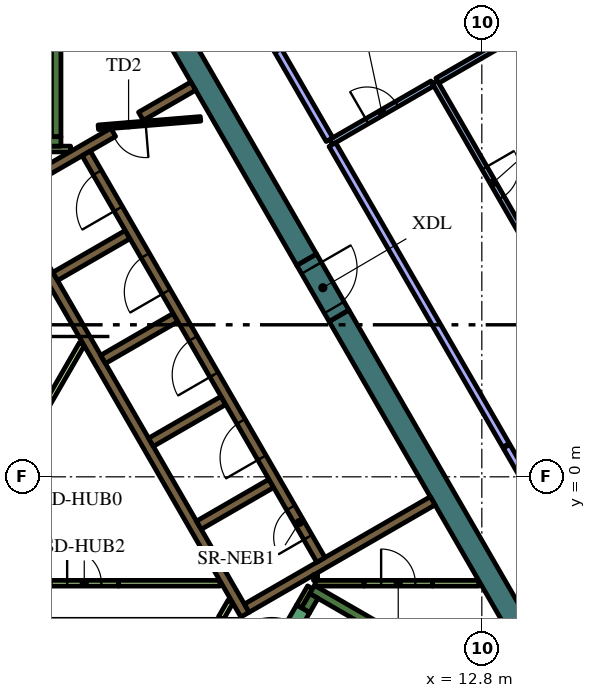
"""IFC4 building model, lengths in metres.
Left out: names, types, materials, properties, quantities, classifications, styles, units other than length and angle.
Written with IfcOpenShell. Run it as: python <this file> out.ifc"""

import sys

from ifc_helpers import new_model, si_unit, direction, frame, frame_2d, origin, place, context, subcontext, project, spatial, polyline, rectangle, outline, extrude, element, fill, save


model = new_model("IFC4")
c1 = context("Model", 3, precision=1e-05, world=origin(), true_north=direction((0.0, 1.0)))
c2 = subcontext(c1, "Body", "Model", "MODEL_VIEW")
j1 = project(units=[si_unit("LENGTHUNIT", "METRE"), si_unit("PLANEANGLEUNIT", "RADIAN")], contexts=[c1])
p1 = place(None, origin())
s1 = spatial("IfcSite", under=j1, at=p1, CompositionType="ELEMENT")
p2 = place(p1, origin())
s2 = spatial("IfcBuilding", under=s1, at=p2, CompositionType="ELEMENT")
p3 = place(p2, frame((0.0, 0.0, 283.8)))
s3 = spatial("IfcBuildingStorey", under=s2, at=p3, CompositionType="ELEMENT", Elevation=283.8)
for number, where, z_axis, x_axis in (
    (1, (9.042, 4.239, 0.0), (0.0, 0.0, 1.0), (0.5, -0.866, 0.0)),
    (2, (1.989, 16.456, 0.0), (0.0, 0.0, 1.0), (0.5, -0.866, 0.0)),
):
    element("IfcWall", number, at=place(p3, frame(where, z_axis=z_axis, x_axis=x_axis)), inside=s3, PredefinedType="SOLIDWALL", context=c2, shape_type="SweptSolid", body=[
        extrude(rectangle(XDim=12.406, YDim=0.6, at=frame_2d((6.203, 0.0))), origin(), (0.0, 0.0, 1.0), 4.2),
    ])
p4 = place(p3, frame((8.334, -2.964, 0.0), z_axis=(0.0, 0.0, 1.0), x_axis=(0.866016039709, -0.500016218704, 0.0)))
e3 = element("IfcWall", 3, at=p4, inside=s3, PredefinedType="SOLIDWALL", context=c2, shape_type="SweptSolid", body=[
    extrude(rectangle(XDim=7.05, YDim=0.25, at=frame_2d((3.525, 0.0))), origin(), (0.0, 0.0, 1.0), 4.2),
])
p5 = place(p3, frame((8.163, -3.511, 0.0), z_axis=(0.0, 0.0, 1.0), x_axis=(0.500127794843, 0.865951608824, 0.0)))
e4 = element("IfcWall", 4, at=p5, inside=s3, PredefinedType="SOLIDWALL", context=c2, shape_type="SweptSolid", body=[
    extrude(rectangle(XDim=0.435, YDim=0.25, at=frame_2d((0.217, 0.0))), origin(), (0.0, 0.0, 1.0), 4.2),
])
p6 = place(p3, frame((1.6, 8.95, 0.0), z_axis=(0.0, 0.0, 1.0), x_axis=(0.0, 1.0, 0.0)))
e5 = element("IfcWall", 5, at=p6, inside=s3, PredefinedType="SOLIDWALL", context=c2, shape_type="SweptSolid", body=[
    extrude(rectangle(XDim=6.8, YDim=0.25, at=frame_2d((3.4, 0.0))), origin(), (0.0, 0.0, 1.0), 4.2),
])
p7 = place(p3, frame((1.05, 8.825, 0.0), z_axis=(0.0, 0.0, 1.0), x_axis=(1.0, 0.0, 0.0)))
e6 = element("IfcWall", 6, at=p7, inside=s3, PredefinedType="SOLIDWALL", context=c2, shape_type="SweptSolid", body=[
    extrude(rectangle(XDim=0.675, YDim=0.25, at=frame_2d((0.337, 0.0))), origin(), (0.0, 0.0, 1.0), 4.2),
])
p8 = place(p3, origin())
e7 = element("IfcWall", 7, at=p8, inside=s3, PredefinedType="SOLIDWALL", context=c2, shape_type="SweptSolid", body=[
    extrude(outline(polyline([(0.332, 6.925), (0.335, 6.925), (0.335, 6.925), (0.335, 6.925), (0.335, 7.075), (0.335, 7.075), (0.335, 7.075), (0.245, 7.075), (0.035, 7.439), (0.252, 7.564), (0.377, 7.348), (1.512, 5.382), (1.637, 5.165), (2.221, 4.153), (2.771, 3.199), (2.896, 2.983), (3.138, 2.564), (4.031, 1.017), (4.156, 0.801), (5.292, -1.165), (5.417, -1.382), (6.073, -2.519), (6.552, -3.348), (6.677, -3.564), (6.46, -3.689), (0.332, 6.925)])), origin(), (0.0, 0.0, 1.0), 4.2),
])
p9 = place(p3, frame((3.1, 9.064, 0.0), z_axis=(0.0, 0.0, 1.0), x_axis=(-0.866030133475, -0.499991807846, 0.0)))
e8 = element("IfcWall", 8, at=p9, inside=s3, PredefinedType="SOLIDWALL", context=c2, shape_type="SweptSolid", body=[
    extrude(rectangle(XDim=3.217, YDim=0.25, at=frame_2d((1.608, 0.0))), origin(), (0.0, 0.0, 1.0), 4.2),
])
p10 = place(p3, frame((1.574, 5.274, 0.0), z_axis=(0.0, 0.0, 1.0), x_axis=(0.866028486751, 0.499994660107, 0.0)))
e9 = element("IfcWall", 9, at=p10, inside=s3, PredefinedType="SOLIDWALL", context=c2, shape_type="SweptSolid", body=[
    extrude(rectangle(XDim=2.2, YDim=0.25, at=frame_2d((1.1, 0.0))), origin(), (0.0, 0.0, 1.0), 4.2),
])
for number, where, z_axis, x_axis in (
    (10, (2.834, 3.091, 0.0), (0.0, 0.0, 1.0), (0.866, 0.5, 0.0)),
    (11, (4.094, 0.909, 0.0), (0.0, 0.0, 1.0), (0.866, 0.5, 0.0)),
    (12, (5.354, -1.274, 0.0), (0.0, 0.0, 1.0), (0.866, 0.5, 0.0)),
):
    element("IfcWall", number, at=place(p3, frame(where, z_axis=z_axis, x_axis=x_axis)), inside=s3, PredefinedType="SOLIDWALL", context=c2, shape_type="SweptSolid", body=[
        extrude(rectangle(XDim=2.2, YDim=0.25, at=frame_2d((1.1, 0.0))), origin(), (0.0, 0.0, 1.0), 4.2),
    ])
p11 = place(p3, frame((11.507, -0.631, 0.0), z_axis=(0.0, 0.0, 1.0), x_axis=(-0.866011447264, -0.500024172624, 0.0)))
e13 = element("IfcWall", 13, at=p11, inside=s3, PredefinedType="SOLIDWALL", context=c2, shape_type="SweptSolid", body=[
    extrude(rectangle(XDim=5.65, YDim=0.25, at=frame_2d((2.825, 0.0))), origin(), (0.0, 0.0, 1.0), 4.2),
])
p12 = place(p3, frame((3.83, 9.486, 0.0), z_axis=(0.0, 0.0, 1.0), x_axis=(0.865986202621, 0.500067892261, 0.0)))
e14 = element("IfcWall", 14, at=p12, inside=s3, PredefinedType="SOLIDWALL", context=c2, shape_type="SweptSolid", body=[
    extrude(rectangle(XDim=1.591, YDim=0.25, at=frame_2d((0.795, 0.0))), origin(), (0.0, 0.0, 1.0), 4.2),
])
for number, where, z_axis, x_axis in (
    (15, (0.941, 1.179, 0.0), (0.0, 0.0, 1.0), (0.5, 0.866, 0.0)),
    (16, (3.238, -2.8, 0.0), (0.0, 0.0, 1.0), (1.0, 0.0, 0.0)),
):
    element("IfcWall", number, at=place(p3, frame(where, z_axis=z_axis, x_axis=x_axis)), inside=s3, PredefinedType="PARTITIONING", context=c2, shape_type="SweptSolid", body=[
        extrude(rectangle(XDim=2.672, YDim=0.15, at=frame_2d((1.336, 0.0))), origin(), (0.0, 0.0, 1.0), 3.55),
    ])
p13 = place(p3, frame((1.05, 8.625, 0.0), z_axis=(0.0, 0.0, 1.0), x_axis=(1.0, 0.0, 0.0)))
e17 = element("IfcWall", 17, at=p13, inside=s3, PredefinedType="PARTITIONING", context=c2, shape_type="SweptSolid", body=[
    extrude(rectangle(XDim=0.929, YDim=0.15, at=frame_2d((0.464, 0.0))), origin(), (0.0, 0.0, 1.0), 3.55),
])
p14 = place(p3, frame((8.412, -2.8, 0.0), z_axis=(0.0, 0.0, 1.0), x_axis=(1.0, 0.0, 0.0)))
e18 = element("IfcWall", 18, at=p14, inside=s3, PredefinedType="PARTITIONING", context=c2, shape_type="SweptSolid", body=[
    extrude(rectangle(XDim=1.288, YDim=0.15, at=frame_2d((0.644, 0.0))), origin(), (0.0, 0.0, 1.0), 4.2),
])
p15 = place(p3, frame((8.37, -2.65, 0.0), z_axis=(0.0, 0.0, 1.0), x_axis=(1.0, 0.0, 0.0)))
e19 = element("IfcWall", 19, at=p15, inside=s3, PredefinedType="PARTITIONING", context=c2, shape_type="SweptSolid", body=[
    extrude(rectangle(XDim=0.108, YDim=0.15, at=frame_2d((0.054, 0.0))), origin(), (0.0, 0.0, 1.0), 4.2),
])
p16 = place(p3, frame((8.281, -2.907, 0.0), z_axis=(0.0, 0.0, 1.0), x_axis=(-0.500193841991, -0.86591346013, 0.0)))
e20 = element("IfcWall", 20, at=p16, inside=s3, PredefinedType="PARTITIONING", context=c2, shape_type="SweptSolid", body=[
    extrude(rectangle(XDim=0.583, YDim=0.15, at=frame_2d((0.292, 0.0))), origin(), (0.0, 0.0, 1.0), 4.2),
])
p17 = place(p3, frame((11.5, -2.801, 0.0), z_axis=(0.0, 0.0, 1.0), x_axis=(1.0, 0.0, 0.0)))
e21 = element("IfcWall", 21, at=p17, inside=s3, PredefinedType="PARTITIONING", context=c2, shape_type="SweptSolid", body=[
    extrude(rectangle(XDim=1.222, YDim=0.15, at=frame_2d((0.611, 0.0))), origin(), (0.0, 0.0, 1.0), 3.55),
])
p18 = place(p3, frame((5.936, -3.718, 0.0), z_axis=(0.0, 0.0, 1.0), x_axis=(0.499890179513, 0.866088799389, 0.0)))
e22 = element("IfcWall", 22, at=p18, inside=s3, PredefinedType="PARTITIONING", context=c2, shape_type="SweptSolid", body=[
    extrude(rectangle(XDim=0.504, YDim=0.15, at=frame_2d((0.252, 0.0))), origin(), (0.0, 0.0, 1.0), 3.55),
])
p19 = place(p3, frame((8.565, -2.185, 0.0), z_axis=(0.0, 0.0, 1.0), x_axis=(-0.499997954832, 0.866026584559, 0.0)))
e23 = element("IfcWall", 23, at=p19, inside=s3, PredefinedType="SOLIDWALL", context=c2, shape_type="SweptSolid", body=[
    extrude(rectangle(XDim=12.35, YDim=0.25, at=frame_2d((6.175, 0.0))), origin(), (0.0, 0.0, 1.0), 4.2),
])
p20 = place(p19, frame((0.685, 0.0, 0.0)))
e24 = element("IfcOpeningElement", 24, at=p20, cuts=e23, PredefinedType="OPENING", context=c2, shape_type="SweptSolid", body=[
    extrude(rectangle(XDim=0.9, YDim=2.1, at=frame_2d((0.45, 1.05))), frame((0.0, 0.135, 0.0), z_axis=(0.0, -1.0, 0.0), x_axis=(1.0, 0.0, 0.0)), (0.0, 0.0, 1.0), 0.27),
])
p21 = place(p19, frame((3.105, 0.0, 0.0)))
e25 = element("IfcOpeningElement", 25, at=p21, cuts=e23, PredefinedType="OPENING", context=c2, shape_type="SweptSolid", body=[
    extrude(rectangle(XDim=1.1, YDim=2.1, at=frame_2d((0.55, 1.05))), frame((0.0, 0.135, 0.0), z_axis=(0.0, -1.0, 0.0), x_axis=(1.0, 0.0, 0.0)), (0.0, 0.0, 1.0), 0.27),
])
p22 = place(p19, frame((5.625, 0.0, 0.0)))
e26 = element("IfcOpeningElement", 26, at=p22, cuts=e23, PredefinedType="OPENING", context=c2, shape_type="SweptSolid", body=[
    extrude(rectangle(XDim=1.1, YDim=2.1, at=frame_2d((0.55, 1.05))), frame((0.0, 0.135, 0.0), z_axis=(0.0, -1.0, 0.0), x_axis=(1.0, 0.0, 0.0)), (0.0, 0.0, 1.0), 0.27),
])
p23 = place(p19, frame((8.145, 0.0, 0.0)))
e27 = element("IfcOpeningElement", 27, at=p23, cuts=e23, PredefinedType="OPENING", context=c2, shape_type="SweptSolid", body=[
    extrude(rectangle(XDim=1.1, YDim=2.1, at=frame_2d((0.55, 1.05))), frame((0.0, 0.135, 0.0), z_axis=(0.0, -1.0, 0.0), x_axis=(1.0, 0.0, 0.0)), (0.0, 0.0, 1.0), 0.27),
])
p24 = place(p19, frame((10.665, 0.0, 0.0)))
e28 = element("IfcOpeningElement", 28, at=p24, cuts=e23, PredefinedType="OPENING", context=c2, shape_type="SweptSolid", body=[
    extrude(rectangle(XDim=1.1, YDim=2.1, at=frame_2d((0.55, 1.05))), frame((0.0, 0.135, 0.0), z_axis=(0.0, -1.0, 0.0), x_axis=(1.0, 0.0, 0.0)), (0.0, 0.0, 1.0), 0.27),
])
p25 = place(p3, frame((7.048, -5.292, 0.0), z_axis=(0.0, 0.0, 1.0), x_axis=(0.49994051562, 0.866059744384, 0.0)))
e29 = element("IfcWall", 29, at=p25, inside=s3, PredefinedType="SOLIDWALL", context=c2, shape_type="SweptSolid", body=[
    extrude(rectangle(XDim=2.1, YDim=0.4, at=frame_2d((1.05, 0.0))), origin(), (0.0, 0.0, 1.0), 4.2),
])
p26 = place(p25, frame((0.45, 0.0, 0.0)))
e30 = element("IfcOpeningElement", 30, at=p26, cuts=e29, PredefinedType="OPENING", context=c2, shape_type="SweptSolid", body=[
    extrude(rectangle(XDim=1.2, YDim=2.1, at=frame_2d((0.6, 1.05))), frame((0.0, 0.21, 0.0), z_axis=(0.0, -1.0, 0.0), x_axis=(1.0, 0.0, 0.0)), (0.0, 0.0, 1.0), 0.42),
])
p27 = place(p3, frame((5.398, 9.419, 0.0), z_axis=(0.0, 0.0, 1.0), x_axis=(-0.996653416376, -0.081743303248, 0.0)))
e31 = element("IfcWall", 31, at=p27, inside=s3, PredefinedType="PARTITIONING", context=c2, shape_type="SweptSolid", body=[
    extrude(rectangle(XDim=2.7, YDim=0.12, at=frame_2d((1.35, 0.0))), origin(), (0.0, 0.0, 1.0), 3.55),
])
p28 = place(p27, frame((1.45, 0.0, 0.0)))
e32 = element("IfcOpeningElement", 32, at=p28, cuts=e31, PredefinedType="OPENING", context=c2, shape_type="SweptSolid", body=[
    extrude(rectangle(XDim=0.9, YDim=2.1, at=frame_2d((0.45, 1.05))), frame((0.0, 0.07, 0.0), z_axis=(0.0, -1.0, 0.0), x_axis=(1.0, 0.0, 0.0)), (0.0, 0.0, 1.0), 0.14),
])
p29 = place(p3, frame((8.192, 5.711, 0.0), z_axis=(0.0, 0.0, 1.0), x_axis=(0.500062241894, -0.865989465428, 0.0)))
e33 = element("IfcWall", 33, at=p29, inside=s3, PredefinedType="SOLIDWALL", context=c2, shape_type="SweptSolid", body=[
    extrude(rectangle(XDim=1.7, YDim=0.6, at=frame_2d((0.85, 0.0))), origin(), (0.0, 0.0, 1.0), 4.2),
])
p30 = place(p29, frame((0.25, 0.0, 0.0)))
e34 = element("IfcOpeningElement", 34, at=p30, cuts=e33, PredefinedType="OPENING", context=c2, shape_type="SweptSolid", body=[
    extrude(rectangle(XDim=1.2, YDim=2.1, at=frame_2d((0.6, 1.05))), frame((0.0, 0.31, 0.0), z_axis=(0.0, -1.0, 0.0), x_axis=(1.0, 0.0, 0.0)), (0.0, 0.0, 1.0), 0.62),
])
p31 = place(p3, frame((1.438, -2.8, 0.0), z_axis=(0.0, 0.0, 1.0), x_axis=(1.0, 0.0, 0.0)))
e35 = element("IfcWall", 35, at=p31, inside=s3, PredefinedType="PARTITIONING", context=c2, shape_type="SweptSolid", body=[
    extrude(rectangle(XDim=1.8, YDim=0.15, at=frame_2d((0.9, 0.0))), origin(), (0.0, 0.0, 1.0), 3.55),
])
p32 = place(p31, frame((0.45, 0.0, 0.0)))
e36 = element("IfcOpeningElement", 36, at=p32, cuts=e35, PredefinedType="OPENING", context=c2, shape_type="SweptSolid", body=[
    extrude(rectangle(XDim=0.9, YDim=2.1, at=frame_2d((0.45, 1.05))), frame((0.0, 0.085, 0.0), z_axis=(0.0, -1.0, 0.0), x_axis=(1.0, 0.0, 0.0)), (0.0, 0.0, 1.0), 0.17),
])
p33 = place(p3, frame((9.7, -2.8, 0.0), z_axis=(0.0, 0.0, 1.0), x_axis=(1.0, 0.0, 0.0)))
e37 = element("IfcWall", 37, at=p33, inside=s3, PredefinedType="PARTITIONING", context=c2, shape_type="SweptSolid", body=[
    extrude(rectangle(XDim=1.8, YDim=0.15, at=frame_2d((0.9, 0.0))), origin(), (0.0, 0.0, 1.0), 3.55),
])
p34 = place(p33, frame((0.45, 0.0, 0.0)))
e38 = element("IfcOpeningElement", 38, at=p34, cuts=e37, PredefinedType="OPENING", context=c2, shape_type="SweptSolid", body=[
    extrude(rectangle(XDim=0.9, YDim=2.1, at=frame_2d((0.45, 1.05))), frame((0.0, 0.085, 0.0), z_axis=(0.0, -1.0, 0.0), x_axis=(1.0, 0.0, 0.0)), (0.0, 0.0, 1.0), 0.17),
])
p35 = place(p3, frame((11.564, 10.387, 0.0), z_axis=(0.0, 0.0, 1.0), x_axis=(0.500002559113, -0.866023926275, 0.0)))
e39 = element("IfcWall", 39, at=p35, inside=s3, PredefinedType="PARTITIONING", context=c2, shape_type="SweptSolid", body=[
    extrude(rectangle(XDim=6.212, YDim=0.15, at=frame_2d((3.106, 0.0))), origin(), (0.0, 0.0, 1.0), 3.55),
])
p36 = place(p35, frame((2.612, 0.0, 0.0)))
e40 = element("IfcOpeningElement", 40, at=p36, cuts=e39, PredefinedType="OPENING", context=c2, shape_type="SweptSolid", body=[
    extrude(rectangle(XDim=0.9, YDim=2.1, at=frame_2d((0.45, 1.05))), frame((0.0, 0.085, 0.0), z_axis=(0.0, -1.0, 0.0), x_axis=(1.0, 0.0, 0.0)), (0.0, 0.0, 1.0), 0.17),
])
p37 = place(p3, frame((11.629, 10.424, 0.0), z_axis=(0.0, 0.0, 1.0), x_axis=(0.866061796884, 0.499936960004, 0.0)))
e41 = element("IfcWall", 41, at=p37, inside=s3, PredefinedType="PARTITIONING", context=c2, shape_type="SweptSolid", body=[
    extrude(rectangle(XDim=3.021, YDim=0.15, at=frame_2d((1.511, 0.0))), origin(), (0.0, 0.0, 1.0), 3.55),
])
p38 = place(p3, frame((8.829, 8.808, 0.0), z_axis=(0.0, 0.0, 1.0), x_axis=(0.866041857893, 0.499971499565, 0.0)))
e42 = element("IfcWall", 42, at=p38, inside=s3, PredefinedType="PARTITIONING", context=c2, shape_type="SweptSolid", body=[
    extrude(rectangle(XDim=3.083, YDim=0.15, at=frame_2d((1.542, 0.0))), origin(), (0.0, 0.0, 1.0), 3.55),
])
p39 = place(p38, frame((1.1, 0.0, 0.0)))
e43 = element("IfcOpeningElement", 43, at=p39, cuts=e42, PredefinedType="OPENING", context=c2, shape_type="SweptSolid", body=[
    extrude(rectangle(XDim=0.9, YDim=2.1, at=frame_2d((0.45, 1.05))), frame((0.0, 0.085, 0.0), z_axis=(0.0, -1.0, 0.0), x_axis=(1.0, 0.0, 0.0)), (0.0, 0.0, 1.0), 0.17),
])
p40 = place(p3, frame((13.436, 0.829, 0.0), z_axis=(0.0, 0.0, 1.0), x_axis=(-0.499983789798, 0.866034762547, 0.0)))
e44 = element("IfcWall", 44, at=p40, inside=s3, PredefinedType="PARTITIONING", context=c2, shape_type="SweptSolid", body=[
    extrude(rectangle(XDim=9.138, YDim=0.2, at=frame_2d((4.569, 0.0))), origin(), (0.0, 0.0, 1.0), 3.55),
])
p41 = place(p3, frame((17.565, -6.324, 0.0), z_axis=(0.0, 0.0, 1.0), x_axis=(-0.499977548053, 0.866038366034, 0.0)))
e45 = element("IfcWall", 45, at=p41, inside=s3, PredefinedType="PARTITIONING", context=c2, shape_type="SweptSolid", body=[
    extrude(rectangle(XDim=8.229, YDim=0.2, at=frame_2d((4.115, 0.0))), origin(), (0.0, 0.0, 1.0), 3.55),
])
p42 = place(p3, frame((8.792, 8.873, 0.0), z_axis=(0.0, 0.0, 1.0), x_axis=(-0.499992600721, 0.866029675718, 0.0)))
e46 = element("IfcWall", 46, at=p42, inside=s3, PredefinedType="PARTITIONING", context=c2, shape_type="SweptSolid", body=[
    extrude(rectangle(XDim=2.712, YDim=0.2, at=frame_2d((1.356, 0.0))), origin(), (0.0, 0.0, 1.0), 3.55),
])
p43 = place(p20, origin())
e47 = element("IfcDoor", 47, at=p43, inside=s3, OperationType="SINGLE_SWING_LEFT", PredefinedType="DOOR", context=c2, shape_type="SweptSolid", body=[
    extrude(rectangle(XDim=0.9, YDim=2.1, at=frame_2d((0.45, 1.05))), frame((0.0, 0.025, 0.0), z_axis=(0.0, -1.0, 0.0), x_axis=(1.0, 0.0, 0.0)), (0.0, 0.0, 1.0), 0.05),
])
fill(e24, e47)
p44 = place(p21, origin())
e48 = element("IfcDoor", 48, at=p44, inside=s3, OperationType="DOUBLE_DOOR_SLIDING", PredefinedType="DOOR", context=c2, shape_type="SweptSolid", body=[
    extrude(rectangle(XDim=1.1, YDim=2.1, at=frame_2d((0.55, 1.05))), frame((0.0, 0.025, 0.0), z_axis=(0.0, -1.0, 0.0), x_axis=(1.0, 0.0, 0.0)), (0.0, 0.0, 1.0), 0.05),
])
fill(e25, e48)
p45 = place(p22, origin())
e49 = element("IfcDoor", 49, at=p45, inside=s3, OperationType="DOUBLE_DOOR_SLIDING", PredefinedType="DOOR", context=c2, shape_type="SweptSolid", body=[
    extrude(rectangle(XDim=1.1, YDim=2.1, at=frame_2d((0.55, 1.05))), frame((0.0, 0.025, 0.0), z_axis=(0.0, -1.0, 0.0), x_axis=(1.0, 0.0, 0.0)), (0.0, 0.0, 1.0), 0.05),
])
fill(e26, e49)
p46 = place(p23, origin())
e50 = element("IfcDoor", 50, at=p46, inside=s3, OperationType="DOUBLE_DOOR_SLIDING", PredefinedType="DOOR", context=c2, shape_type="SweptSolid", body=[
    extrude(rectangle(XDim=1.1, YDim=2.1, at=frame_2d((0.55, 1.05))), frame((0.0, 0.025, 0.0), z_axis=(0.0, -1.0, 0.0), x_axis=(1.0, 0.0, 0.0)), (0.0, 0.0, 1.0), 0.05),
])
fill(e27, e50)
p47 = place(p24, origin())
e51 = element("IfcDoor", 51, at=p47, inside=s3, OperationType="DOUBLE_DOOR_SLIDING", PredefinedType="DOOR", context=c2, shape_type="SweptSolid", body=[
    extrude(rectangle(XDim=1.1, YDim=2.1, at=frame_2d((0.55, 1.05))), frame((0.0, 0.025, 0.0), z_axis=(0.0, -1.0, 0.0), x_axis=(1.0, 0.0, 0.0)), (0.0, 0.0, 1.0), 0.05),
])
fill(e28, e51)
p48 = place(p28, origin())
e52 = element("IfcDoor", 52, at=p48, inside=s3, OperationType="SINGLE_SWING_LEFT", PredefinedType="DOOR", context=c2, shape_type="SweptSolid", body=[
    extrude(rectangle(XDim=0.9, YDim=2.1, at=frame_2d((0.45, 1.05))), frame((0.0, 0.025, 0.0), z_axis=(0.0, -1.0, 0.0), x_axis=(1.0, 0.0, 0.0)), (0.0, 0.0, 1.0), 0.05),
])
fill(e32, e52)
p49 = place(p30, origin())
e53 = element("IfcDoor", 53, at=p49, inside=s3, OperationType="SINGLE_SWING_LEFT", PredefinedType="DOOR", context=c2, shape_type="SweptSolid", body=[
    extrude(rectangle(XDim=1.2, YDim=2.1, at=frame_2d((0.6, 1.05))), frame((0.0, 0.025, 0.0), z_axis=(0.0, -1.0, 0.0), x_axis=(1.0, 0.0, 0.0)), (0.0, 0.0, 1.0), 0.05),
])
fill(e34, e53)
p50 = place(p32, origin())
e54 = element("IfcDoor", 54, at=p50, inside=s3, OperationType="SINGLE_SWING_LEFT", PredefinedType="DOOR", context=c2, shape_type="SweptSolid", body=[
    extrude(rectangle(XDim=0.9, YDim=2.1, at=frame_2d((0.45, 1.05))), frame((0.0, 0.025, 0.0), z_axis=(0.0, -1.0, 0.0), x_axis=(1.0, 0.0, 0.0)), (0.0, 0.0, 1.0), 0.05),
])
fill(e36, e54)
p51 = place(p34, origin())
e55 = element("IfcDoor", 55, at=p51, inside=s3, OperationType="SINGLE_SWING_LEFT", PredefinedType="DOOR", context=c2, shape_type="SweptSolid", body=[
    extrude(rectangle(XDim=0.9, YDim=2.1, at=frame_2d((0.45, 1.05))), frame((0.0, 0.025, 0.0), z_axis=(0.0, -1.0, 0.0), x_axis=(1.0, 0.0, 0.0)), (0.0, 0.0, 1.0), 0.05),
])
fill(e38, e55)
p52 = place(p36, origin())
e56 = element("IfcDoor", 56, at=p52, inside=s3, OperationType="SINGLE_SWING_LEFT", PredefinedType="DOOR", context=c2, shape_type="SweptSolid", body=[
    extrude(rectangle(XDim=0.9, YDim=2.1, at=frame_2d((0.45, 1.05))), frame((0.0, 0.025, 0.0), z_axis=(0.0, -1.0, 0.0), x_axis=(1.0, 0.0, 0.0)), (0.0, 0.0, 1.0), 0.05),
])
fill(e40, e56)
p53 = place(p39, origin())
e57 = element("IfcDoor", 57, at=p53, inside=s3, OperationType="SINGLE_SWING_RIGHT", PredefinedType="DOOR", context=c2, shape_type="SweptSolid", body=[
    extrude(rectangle(XDim=0.9, YDim=2.1, at=frame_2d((0.45, 1.05))), frame((0.0, 0.025, 0.0), z_axis=(0.0, -1.0, 0.0), x_axis=(1.0, 0.0, 0.0)), (0.0, 0.0, 1.0), 0.05),
])
fill(e43, e57)
save(model, sys.argv[1])
